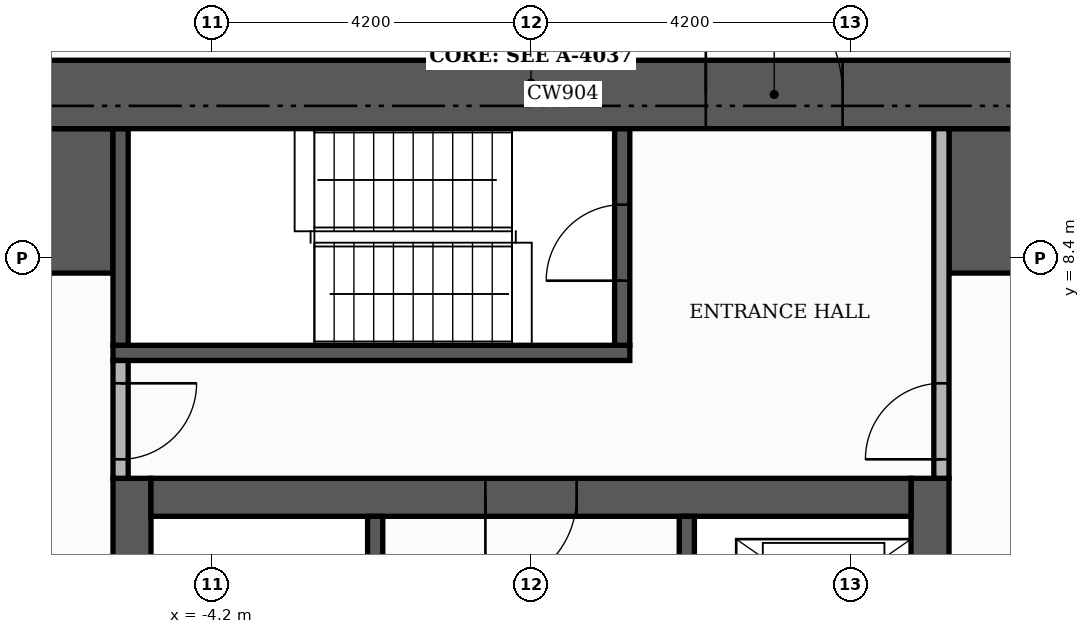
"""IFC4 building model, lengths in metres.
Left out: names, types, materials, properties, quantities, classifications, styles, units other than length and angle.
Written with IfcOpenShell. Run it as: python <this file> out.ifc"""

import sys

from ifc_helpers import new_model, si_unit, direction, frame, frame_2d, origin, place, context, subcontext, project, spatial, rectangle, extrude, element, fill, save


model = new_model("IFC4")
c1 = context("Model", 3, precision=1e-05, world=origin(), true_north=direction((0.0, 1.0)))
c2 = subcontext(c1, "Body", "Model", "MODEL_VIEW")
j1 = project(units=[si_unit("LENGTHUNIT", "METRE"), si_unit("PLANEANGLEUNIT", "RADIAN")], contexts=[c1])
p1 = place(None, origin())
s1 = spatial("IfcSite", under=j1, at=p1, CompositionType="ELEMENT")
p2 = place(p1, origin())
s2 = spatial("IfcBuilding", under=s1, at=p2, CompositionType="ELEMENT")
p3 = place(p2, frame((0.0, 0.0, 219.6)))
s3 = spatial("IfcBuildingStorey", under=s2, at=p3, CompositionType="ELEMENT", Elevation=219.6)
for number, where, z_axis, x_axis in (
    (1, (-5.25, -5.0, 0.0), (0.0, 0.0, 1.0), (0.0, 1.0, 0.0)),
    (2, (5.25, -5.0, 0.0), (0.0, 0.0, 1.0), (0.0, 1.0, 0.0)),
):
    element("IfcWall", number, at=place(p3, frame(where, z_axis=z_axis, x_axis=x_axis)), inside=s3, PredefinedType="SHEAR", context=c2, shape_type="SweptSolid", body=[
        extrude(rectangle(XDim=10.5, YDim=0.5, at=frame_2d((5.25, 0.0))), origin(), (0.0, 0.0, 1.0), 3.48),
    ])
p4 = place(p3, frame((-5.0, 5.25, 0.0), z_axis=(0.0, 0.0, 1.0), x_axis=(1.0, 0.0, 0.0)))
e3 = element("IfcWall", 3, at=p4, inside=s3, PredefinedType="SHEAR", context=c2, shape_type="SweptSolid", body=[
    extrude(rectangle(XDim=10.0, YDim=0.5, at=frame_2d((5.0, 0.0))), origin(), (0.0, 0.0, 1.0), 3.48),
])
p5 = place(p4, frame((4.4, 0.0, 0.0)))
e4 = element("IfcOpeningElement", 4, at=p5, cuts=e3, PredefinedType="OPENING", context=c2, shape_type="SweptSolid", body=[
    extrude(rectangle(XDim=1.2, YDim=2.1, at=frame_2d((0.6, 1.05))), frame((0.0, 0.26, 0.0), z_axis=(0.0, -1.0, 0.0), x_axis=(1.0, 0.0, 0.0)), (0.0, 0.0, 1.0), 0.52),
])
for number, where, z_axis, x_axis in (
    (5, (-10.1, 9.15, 0.0), (0.0, 0.0, 1.0), (1.0, 0.0, 0.0)),
    (6, (5.5, 9.15, 0.0), (0.0, 0.0, 1.0), (1.0, 0.0, 0.0)),
):
    element("IfcWall", number, at=place(p3, frame(where, z_axis=z_axis, x_axis=x_axis)), inside=s3, PredefinedType="SHEAR", context=c2, shape_type="SweptSolid", body=[
        extrude(rectangle(XDim=4.6, YDim=1.9, at=frame_2d((2.3, 0.0))), origin(), (0.0, 0.0, 1.0), 3.48),
    ])
p6 = place(p3, frame((-2.05, -1.4, 0.0), z_axis=(0.0, 0.0, 1.0), x_axis=(0.0, 1.0, 0.0)))
e7 = element("IfcWall", 7, at=p6, inside=s3, PredefinedType="SHEAR", context=c2, shape_type="SweptSolid", body=[
    extrude(rectangle(XDim=6.4, YDim=0.2, at=frame_2d((3.2, 0.0))), origin(), (0.0, 0.0, 1.0), 3.48),
])
p7 = place(p6, frame((0.15, 0.0, 0.0)))
e8 = element("IfcOpeningElement", 8, at=p7, cuts=e7, PredefinedType="OPENING", context=c2, shape_type="SweptSolid", body=[
    extrude(rectangle(XDim=1.0, YDim=2.1, at=frame_2d((0.5, 1.05))), frame((0.0, 0.11, 0.0), z_axis=(0.0, -1.0, 0.0), x_axis=(1.0, 0.0, 0.0)), (0.0, 0.0, 1.0), 0.22),
])
p8 = place(p3, frame((-5.5, 7.15, 0.0), z_axis=(0.0, 0.0, 1.0), x_axis=(1.0, 0.0, 0.0)))
e9 = element("IfcWall", 9, at=p8, inside=s3, PredefinedType="SHEAR", context=c2, shape_type="SweptSolid", body=[
    extrude(rectangle(XDim=6.8, YDim=0.2, at=frame_2d((3.4, 0.0))), origin(), (0.0, 0.0, 1.0), 3.48),
])
p9 = place(p3, frame((-5.4, 7.25, 0.0), z_axis=(0.0, 0.0, 1.0), x_axis=(0.0, 1.0, 0.0)))
e10 = element("IfcWall", 10, at=p9, inside=s3, PredefinedType="SHEAR", context=c2, shape_type="SweptSolid", body=[
    extrude(rectangle(XDim=2.85, YDim=0.2, at=frame_2d((1.425, 0.0))), origin(), (0.0, 0.0, 1.0), 3.48),
])
p10 = place(p3, frame((1.2, 7.25, 0.0), z_axis=(0.0, 0.0, 1.0), x_axis=(0.0, 1.0, 0.0)))
e11 = element("IfcWall", 11, at=p10, inside=s3, PredefinedType="SHEAR", context=c2, shape_type="SweptSolid", body=[
    extrude(rectangle(XDim=2.85, YDim=0.2, at=frame_2d((1.425, 0.0))), origin(), (0.0, 0.0, 1.0), 3.48),
])
p11 = place(p10, frame((0.85, 0.0, 0.0)))
e12 = element("IfcOpeningElement", 12, at=p11, cuts=e11, PredefinedType="OPENING", context=c2, shape_type="SweptSolid", body=[
    extrude(rectangle(XDim=1.0, YDim=2.1, at=frame_2d((0.5, 1.05))), frame((0.0, 0.11, 0.0), z_axis=(0.0, -1.0, 0.0), x_axis=(1.0, 0.0, 0.0)), (0.0, 0.0, 1.0), 0.22),
])
p12 = place(p3, frame((2.05, 1.6, 0.0), z_axis=(0.0, 0.0, 1.0), x_axis=(0.0, 1.0, 0.0)))
e13 = element("IfcWall", 13, at=p12, inside=s3, PredefinedType="SHEAR", context=c2, shape_type="SweptSolid", body=[
    extrude(rectangle(XDim=3.4, YDim=0.2, at=frame_2d((1.7, 0.0))), origin(), (0.0, 0.0, 1.0), 3.48),
])
p13 = place(p12, frame((1.75, 0.0, 0.0)))
e14 = element("IfcOpeningElement", 14, at=p13, cuts=e13, PredefinedType="OPENING", context=c2, shape_type="SweptSolid", body=[
    extrude(rectangle(XDim=1.1, YDim=2.1, at=frame_2d((0.55, 1.05))), frame((0.0, 0.11, 0.0), z_axis=(0.0, -1.0, 0.0), x_axis=(1.0, 0.0, 0.0)), (0.0, 0.0, 1.0), 0.22),
])
p14 = place(p12, frame((0.15, 0.0, 0.0)))
e15 = element("IfcOpeningElement", 15, at=p14, cuts=e13, PredefinedType="OPENING", context=c2, shape_type="SweptSolid", body=[
    extrude(rectangle(XDim=0.8, YDim=2.1, at=frame_2d((0.4, 1.05))), frame((0.0, 0.11, 0.0), z_axis=(0.0, -1.0, 0.0), x_axis=(1.0, 0.0, 0.0)), (0.0, 0.0, 1.0), 0.22),
])
p15 = place(p3, frame((-11.0, 10.55, 0.0), z_axis=(0.0, 0.0, 1.0), x_axis=(1.0, 0.0, 0.0)))
e16 = element("IfcWall", 16, at=p15, inside=s3, PredefinedType="SHEAR", context=c2, shape_type="SweptSolid", body=[
    extrude(rectangle(XDim=22.0, YDim=0.9, at=frame_2d((11.0, 0.0))), origin(), (0.0, 0.0, 1.0), 3.48),
])
p16 = place(p15, frame((13.3, 0.0, 0.0)))
e17 = element("IfcOpeningElement", 17, at=p16, cuts=e16, PredefinedType="OPENING", context=c2, shape_type="SweptSolid", body=[
    extrude(rectangle(XDim=1.8, YDim=2.2, at=frame_2d((0.9, 1.1))), frame((0.0, 0.46, 0.0), z_axis=(0.0, -1.0, 0.0), x_axis=(1.0, 0.0, 0.0)), (0.0, 0.0, 1.0), 0.92),
])
p17 = place(p3, frame((-5.4, 5.5, 0.0), z_axis=(0.0, 0.0, 1.0), x_axis=(0.0, 1.0, 0.0)))
e18 = element("IfcWall", 18, at=p17, inside=s3, PredefinedType="PARTITIONING", context=c2, shape_type="SweptSolid", body=[
    extrude(rectangle(XDim=1.55, YDim=0.2, at=frame_2d((0.775, 0.0))), origin(), (0.0, 0.0, 1.0), 3.48),
])
p18 = place(p17, frame((0.25, 0.0, 0.0)))
e19 = element("IfcOpeningElement", 19, at=p18, cuts=e18, PredefinedType="OPENING", context=c2, shape_type="SweptSolid", body=[
    extrude(rectangle(XDim=1.0, YDim=2.1, at=frame_2d((0.5, 1.05))), frame((0.0, 0.11, 0.0), z_axis=(0.0, -1.0, 0.0), x_axis=(1.0, 0.0, 0.0)), (0.0, 0.0, 1.0), 0.22),
])
p19 = place(p3, frame((5.4, 5.5, 0.0), z_axis=(0.0, 0.0, 1.0), x_axis=(0.0, 1.0, 0.0)))
e20 = element("IfcWall", 20, at=p19, inside=s3, PredefinedType="PARTITIONING", context=c2, shape_type="SweptSolid", body=[
    extrude(rectangle(XDim=4.6, YDim=0.2, at=frame_2d((2.3, 0.0))), origin(), (0.0, 0.0, 1.0), 3.48),
])
p20 = place(p19, frame((0.25, 0.0, 0.0)))
e21 = element("IfcOpeningElement", 21, at=p20, cuts=e20, PredefinedType="OPENING", context=c2, shape_type="SweptSolid", body=[
    extrude(rectangle(XDim=1.0, YDim=2.1, at=frame_2d((0.5, 1.05))), frame((0.0, 0.11, 0.0), z_axis=(0.0, -1.0, 0.0), x_axis=(1.0, 0.0, 0.0)), (0.0, 0.0, 1.0), 0.22),
])
p21 = place(p5, frame((1.2, 0.0, 0.0), z_axis=(0.0, 0.0, 1.0), x_axis=(-1.0, 0.0, 0.0)))
e22 = element("IfcDoor", 22, at=p21, inside=s3, OperationType="SINGLE_SWING_LEFT", PredefinedType="DOOR", context=c2, shape_type="SweptSolid", body=[
    extrude(rectangle(XDim=1.2, YDim=2.1, at=frame_2d((0.6, 1.05))), frame((0.0, 0.025, 0.0), z_axis=(0.0, -1.0, 0.0), x_axis=(1.0, 0.0, 0.0)), (0.0, 0.0, 1.0), 0.05),
])
fill(e4, e22)
p22 = place(p11, origin())
e23 = element("IfcDoor", 23, at=p22, inside=s3, OperationType="SINGLE_SWING_LEFT", PredefinedType="DOOR", context=c2, shape_type="SweptSolid", body=[
    extrude(rectangle(XDim=1.0, YDim=2.1, at=frame_2d((0.5, 1.05))), frame((0.0, 0.025, 0.0), z_axis=(0.0, -1.0, 0.0), x_axis=(1.0, 0.0, 0.0)), (0.0, 0.0, 1.0), 0.05),
])
fill(e12, e23)
p23 = place(p18, frame((1.0, 0.0, 0.0), z_axis=(0.0, 0.0, 1.0), x_axis=(-1.0, 0.0, 0.0)))
e24 = element("IfcDoor", 24, at=p23, inside=s3, OperationType="SINGLE_SWING_RIGHT", PredefinedType="DOOR", context=c2, shape_type="SweptSolid", body=[
    extrude(rectangle(XDim=1.0, YDim=2.1, at=frame_2d((0.5, 1.05))), frame((0.0, 0.025, 0.0), z_axis=(0.0, -1.0, 0.0), x_axis=(1.0, 0.0, 0.0)), (0.0, 0.0, 1.0), 0.05),
])
fill(e19, e24)
p24 = place(p20, origin())
e25 = element("IfcDoor", 25, at=p24, inside=s3, OperationType="SINGLE_SWING_LEFT", PredefinedType="DOOR", context=c2, shape_type="SweptSolid", body=[
    extrude(rectangle(XDim=1.0, YDim=2.1, at=frame_2d((0.5, 1.05))), frame((0.0, 0.025, 0.0), z_axis=(0.0, -1.0, 0.0), x_axis=(1.0, 0.0, 0.0)), (0.0, 0.0, 1.0), 0.05),
])
fill(e21, e25)
p25 = place(p16, origin())
e26 = element("IfcDoor", 26, at=p25, inside=s3, OperationType="DOUBLE_DOOR_SINGLE_SWING", PredefinedType="DOOR", context=c2, shape_type="SweptSolid", body=[
    extrude(rectangle(XDim=1.8, YDim=2.2, at=frame_2d((0.9, 1.1))), frame((0.0, 0.025, 0.0), z_axis=(0.0, -1.0, 0.0), x_axis=(1.0, 0.0, 0.0)), (0.0, 0.0, 1.0), 0.05),
])
fill(e17, e26)
save(model, sys.argv[1])
